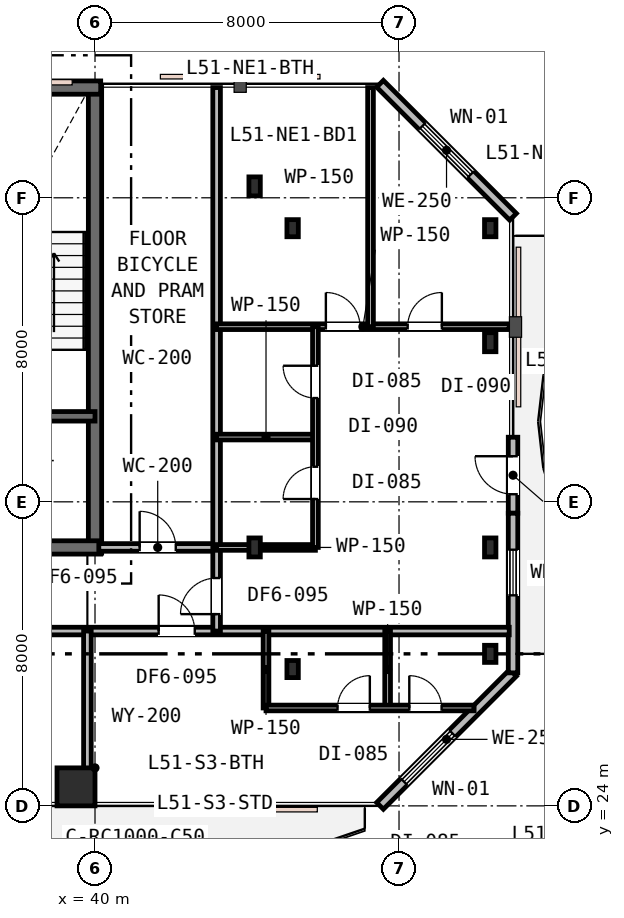
"""IFC4 building model, lengths in metres.
Left out: names, types, materials, properties, quantities, classifications, styles, units other than length and angle.
Written with IfcOpenShell. Run it as: python <this file> out.ifc"""

import sys

from ifc_helpers import new_model, si_unit, direction, frame, frame_2d, origin, origin_2d, place, context, subcontext, project, spatial, rectangle, i_section, extrude, element, fill, save


model = new_model("IFC4")
c1 = context("Model", 3, precision=1e-05, world=origin(), true_north=direction((0.0, 1.0)))
c2 = subcontext(c1, "Body", "Model", "MODEL_VIEW")
j1 = project(units=[si_unit("LENGTHUNIT", "METRE"), si_unit("PLANEANGLEUNIT", "RADIAN")], contexts=[c1])
p1 = place(None, origin())
s1 = spatial("IfcSite", under=j1, at=p1, CompositionType="ELEMENT")
p2 = place(p1, origin())
s2 = spatial("IfcBuilding", under=s1, at=p2, CompositionType="ELEMENT")
p3 = place(p2, frame((0.0, 0.0, 197.4)))
s3 = spatial("IfcBuildingStorey", under=s2, at=p3, CompositionType="ELEMENT", Elevation=197.4)
p4 = place(p3, frame((40.0, 30.65, 0.0), z_axis=(0.0, 0.0, 1.0), x_axis=(0.0, 1.0, 0.0)))
e1 = element("IfcWall", 1, at=p4, inside=s3, PredefinedType="SHEAR", context=c2, shape_type="SweptSolid", body=[
    extrude(rectangle(XDim=12.3, YDim=0.35, at=frame_2d((6.15, 0.0))), origin(), (0.0, 0.0, 1.0), 3.6),
])
p5 = place(p3, frame((15.85, 42.9, 0.0), z_axis=(0.0, 0.0, 1.0), x_axis=(1.0, 0.0, 0.0)))
e2 = element("IfcWall", 2, at=p5, inside=s3, PredefinedType="SHEAR", context=c2, shape_type="SweptSolid", body=[
    extrude(rectangle(XDim=24.3, YDim=0.35, at=frame_2d((12.15, 0.0))), origin(), (0.0, 0.0, 1.0), 3.6),
])
p6 = place(p5, frame((1.6, 0.0, 0.95)))
e3 = element("IfcOpeningElement", 3, at=p6, cuts=e2, PredefinedType="OPENING", context=c2, shape_type="SweptSolid", body=[
    extrude(rectangle(XDim=1.2, YDim=1.6, at=frame_2d((0.6, 0.8))), frame((0.0, 0.185, 0.0), z_axis=(0.0, -1.0, 0.0), x_axis=(1.0, 0.0, 0.0)), (0.0, 0.0, 1.0), 0.37),
])
p7 = place(p5, frame((16.5, 0.0, 0.95)))
e4 = element("IfcOpeningElement", 4, at=p7, cuts=e2, PredefinedType="OPENING", context=c2, shape_type="SweptSolid", body=[
    extrude(rectangle(XDim=1.2, YDim=1.6, at=frame_2d((0.6, 0.8))), frame((0.0, 0.185, 0.0), z_axis=(0.0, -1.0, 0.0), x_axis=(1.0, 0.0, 0.0)), (0.0, 0.0, 1.0), 0.37),
])
p8 = place(p5, frame((21.6, 0.0, 0.95)))
e5 = element("IfcOpeningElement", 5, at=p8, cuts=e2, PredefinedType="OPENING", context=c2, shape_type="SweptSolid", body=[
    extrude(rectangle(XDim=1.2, YDim=1.6, at=frame_2d((0.6, 0.8))), frame((0.0, 0.185, 0.0), z_axis=(0.0, -1.0, 0.0), x_axis=(1.0, 0.0, 0.0)), (0.0, 0.0, 1.0), 0.37),
])
p9 = place(p3, frame((28.95, 30.8, 0.0), z_axis=(0.0, 0.0, 1.0), x_axis=(1.0, 0.0, 0.0)))
e6 = element("IfcWall", 6, at=p9, inside=s3, PredefinedType="SHEAR", context=c2, shape_type="SweptSolid", body=[
    extrude(rectangle(XDim=11.2, YDim=0.35, at=frame_2d((5.6, 0.0))), origin(), (0.0, 0.0, 1.0), 3.6),
])
p10 = place(p9, frame((7.65, 0.0, 0.0)))
e7 = element("IfcOpeningElement", 7, at=p10, cuts=e6, PredefinedType="OPENING", context=c2, shape_type="SweptSolid", body=[
    extrude(rectangle(XDim=1.1, YDim=2.15, at=frame_2d((0.55, 1.075))), frame((0.0, 0.185, 0.0), z_axis=(0.0, -1.0, 0.0), x_axis=(1.0, 0.0, 0.0)), (0.0, 0.0, 1.0), 0.37),
])
p11 = place(p3, frame((33.95, 34.25, 0.0), z_axis=(0.0, 0.0, 1.0), x_axis=(1.0, 0.0, 0.0)))
e8 = element("IfcWall", 8, at=p11, inside=s3, PredefinedType="SHEAR", context=c2, shape_type="SweptSolid", body=[
    extrude(rectangle(XDim=6.05, YDim=0.25, at=frame_2d((3.025, 0.0))), origin(), (0.0, 0.0, 1.0), 3.6),
])
p12 = place(p11, frame((3.7, 0.0, 0.0)))
e9 = element("IfcOpeningElement", 9, at=p12, cuts=e8, PredefinedType="OPENING", context=c2, shape_type="SweptSolid", body=[
    extrude(rectangle(XDim=1.0, YDim=2.15, at=frame_2d((0.5, 1.075))), frame((0.0, 0.135, 0.0), z_axis=(0.0, -1.0, 0.0), x_axis=(1.0, 0.0, 0.0)), (0.0, 0.0, 1.0), 0.27),
])
p13 = place(p11, frame((0.55, 0.0, 0.0)))
e10 = element("IfcOpeningElement", 10, at=p13, cuts=e8, PredefinedType="OPENING", context=c2, shape_type="SweptSolid", body=[
    extrude(rectangle(XDim=1.1, YDim=2.15, at=frame_2d((0.55, 1.075))), frame((0.0, 0.135, 0.0), z_axis=(0.0, -1.0, 0.0), x_axis=(1.0, 0.0, 0.0)), (0.0, 0.0, 1.0), 0.27),
])
p14 = place(p3, frame((39.5, 24.5, 0.0), z_axis=(0.0, 0.0, 1.0), x_axis=(1.0, 0.0, 0.0)))
e11 = element("IfcColumn", 11, at=p14, inside=s3, PredefinedType="COLUMN", context=c2, shape_type="SweptSolid", body=[
    extrude(rectangle(XDim=1.0, YDim=1.0, at=origin_2d()), origin(), (0.0, 0.0, 1.0), 3.6),
])
for number, where, z_axis, x_axis in (
    (12, (45.2, 27.6, 0.0), (0.0, 0.0, 1.0), (1.0, 0.0, 0.0)),
    (13, (45.2, 39.2, 0.0), (0.0, 0.0, 1.0), (1.0, 0.0, 0.0)),
    (14, (50.4, 28.0, 0.0), (0.0, 0.0, 1.0), (1.0, 0.0, 0.0)),
    (15, (50.4, 39.2, 0.0), (0.0, 0.0, 1.0), (1.0, 0.0, 0.0)),
):
    element("IfcColumn", number, at=place(p3, frame(where, z_axis=z_axis, x_axis=x_axis)), inside=s3, PredefinedType="COLUMN", context=c2, shape_type="SweptSolid", body=[
        extrude(i_section(OverallWidth=0.3, OverallDepth=0.45, WebThickness=0.014, FlangeThickness=0.026, FilletRadius=0.027, at=origin_2d()), origin(), (0.0, 0.0, 1.0), 3.6),
    ])
for number, where, z_axis, x_axis in (
    (16, (44.2, 30.8, 0.0), (0.0, 0.0, 1.0), (1.0, 0.0, 0.0)),
    (17, (44.2, 40.3, 0.0), (0.0, 0.0, 1.0), (1.0, 0.0, 0.0)),
    (18, (50.4, 30.8, 0.0), (0.0, 0.0, 1.0), (1.0, 0.0, 0.0)),
    (19, (50.4, 36.2, 0.0), (0.0, 0.0, 1.0), (1.0, 0.0, 0.0)),
):
    element("IfcColumn", number, at=place(p3, frame(where, z_axis=z_axis, x_axis=x_axis)), inside=s3, PredefinedType="COLUMN", context=c2, shape_type="SweptSolid", body=[
        extrude(i_section(OverallWidth=0.3, OverallDepth=0.5, WebThickness=0.015, FlangeThickness=0.028, FilletRadius=0.027, at=origin_2d()), origin(), (0.0, 0.0, 1.0), 3.6),
    ])
p15 = place(p3, frame((47.5, 24.0, 0.0), z_axis=(0.0, 0.0, 1.0), x_axis=(0.707106781187, 0.707106781187, 0.0)))
e20 = element("IfcWall", 20, at=p15, inside=s3, PredefinedType="STANDARD", context=c2, shape_type="SweptSolid", body=[
    extrude(rectangle(XDim=4.95, YDim=0.25, at=frame_2d((2.475, 0.0))), origin(), (0.0, 0.0, 1.0), 3.33),
])
p16 = place(p15, frame((0.896, 0.0, 0.75)))
e21 = element("IfcOpeningElement", 21, at=p16, cuts=e20, PredefinedType="OPENING", context=c2, shape_type="SweptSolid", body=[
    extrude(rectangle(XDim=1.8, YDim=1.85, at=frame_2d((0.9, 0.925))), frame((0.0, 0.135, 0.0), z_axis=(0.0, -1.0, 0.0), x_axis=(1.0, 0.0, 0.0)), (0.0, 0.0, 1.0), 0.27),
])
p17 = place(p3, frame((51.0, 31.7, 0.0), z_axis=(0.0, 0.0, 1.0), x_axis=(0.0, 1.0, 0.0)))
e22 = element("IfcWall", 22, at=p17, inside=s3, PredefinedType="STANDARD", context=c2, shape_type="SweptSolid", body=[
    extrude(rectangle(XDim=2.0, YDim=0.25, at=frame_2d((1.0, 0.0))), origin(), (0.0, 0.0, 1.0), 3.33),
])
p18 = place(p17, frame((0.5, 0.0, 0.0)))
e23 = element("IfcOpeningElement", 23, at=p18, cuts=e22, PredefinedType="OPENING", context=c2, shape_type="SweptSolid", body=[
    extrude(rectangle(XDim=1.0, YDim=2.15, at=frame_2d((0.5, 1.075))), frame((0.0, 0.135, 0.0), z_axis=(0.0, -1.0, 0.0), x_axis=(1.0, 0.0, 0.0)), (0.0, 0.0, 1.0), 0.27),
])
p19 = place(p3, frame((51.0, 27.5, 0.0), z_axis=(0.0, 0.0, 1.0), x_axis=(0.0, 1.0, 0.0)))
e24 = element("IfcWall", 24, at=p19, inside=s3, PredefinedType="STANDARD", context=c2, shape_type="SweptSolid", body=[
    extrude(rectangle(XDim=4.2, YDim=0.25, at=frame_2d((2.1, 0.0))), origin(), (0.0, 0.0, 1.0), 3.33),
])
p20 = place(p19, frame((2.04, 0.0, 0.85)))
e25 = element("IfcOpeningElement", 25, at=p20, cuts=e24, PredefinedType="OPENING", context=c2, shape_type="SweptSolid", body=[
    extrude(rectangle(XDim=1.2, YDim=1.6, at=frame_2d((0.6, 0.8))), frame((0.0, 0.135, 0.0), z_axis=(0.0, -1.0, 0.0), x_axis=(1.0, 0.0, 0.0)), (0.0, 0.0, 1.0), 0.27),
])
p21 = place(p3, frame((51.0, 39.5, 0.0), z_axis=(0.0, 0.0, 1.0), x_axis=(-0.707106781187, 0.707106781187, 0.0)))
e26 = element("IfcWall", 26, at=p21, inside=s3, PredefinedType="STANDARD", context=c2, shape_type="SweptSolid", body=[
    extrude(rectangle(XDim=4.95, YDim=0.25, at=frame_2d((2.475, 0.0))), origin(), (0.0, 0.0, 1.0), 3.33),
])
p22 = place(p21, frame((1.575, 0.0, 0.75)))
e27 = element("IfcOpeningElement", 27, at=p22, cuts=e26, PredefinedType="OPENING", context=c2, shape_type="SweptSolid", body=[
    extrude(rectangle(XDim=1.8, YDim=1.85, at=frame_2d((0.9, 0.925))), frame((0.0, 0.135, 0.0), z_axis=(0.0, -1.0, 0.0), x_axis=(1.0, 0.0, 0.0)), (0.0, 0.0, 1.0), 0.27),
])
p23 = place(p3, frame((15.4, 28.6, 0.0), z_axis=(0.0, 0.0, 1.0), x_axis=(1.0, 0.0, 0.0)))
e28 = element("IfcWall", 28, at=p23, inside=s3, PredefinedType="PARTITIONING", context=c2, shape_type="SweptSolid", body=[
    extrude(rectangle(XDim=35.5, YDim=0.2, at=frame_2d((17.75, 0.0))), origin(), (0.0, 0.0, 1.0), 2.92),
])
p24 = place(p23, frame((11.525, 0.0, 0.0)))
e29 = element("IfcOpeningElement", 29, at=p24, cuts=e28, PredefinedType="OPENING", context=c2, shape_type="SweptSolid", body=[
    extrude(rectangle(XDim=0.95, YDim=2.15, at=frame_2d((0.475, 1.075))), frame((0.0, 0.11, 0.0), z_axis=(0.0, -1.0, 0.0), x_axis=(1.0, 0.0, 0.0)), (0.0, 0.0, 1.0), 0.22),
])
p25 = place(p23, frame((19.425, 0.0, 0.0)))
e30 = element("IfcOpeningElement", 30, at=p25, cuts=e28, PredefinedType="OPENING", context=c2, shape_type="SweptSolid", body=[
    extrude(rectangle(XDim=0.95, YDim=2.15, at=frame_2d((0.475, 1.075))), frame((0.0, 0.11, 0.0), z_axis=(0.0, -1.0, 0.0), x_axis=(1.0, 0.0, 0.0)), (0.0, 0.0, 1.0), 0.22),
])
p26 = place(p23, frame((26.275, 0.0, 0.0)))
e31 = element("IfcOpeningElement", 31, at=p26, cuts=e28, PredefinedType="OPENING", context=c2, shape_type="SweptSolid", body=[
    extrude(rectangle(XDim=0.95, YDim=2.15, at=frame_2d((0.475, 1.075))), frame((0.0, 0.11, 0.0), z_axis=(0.0, -1.0, 0.0), x_axis=(1.0, 0.0, 0.0)), (0.0, 0.0, 1.0), 0.22),
])
p27 = place(p3, frame((40.1, 30.8, 0.0), z_axis=(0.0, 0.0, 1.0), x_axis=(1.0, 0.0, 0.0)))
e32 = element("IfcWall", 32, at=p27, inside=s3, PredefinedType="PARTITIONING", context=c2, shape_type="SweptSolid", body=[
    extrude(rectangle(XDim=3.1, YDim=0.2, at=frame_2d((1.55, 0.0))), origin(), (0.0, 0.0, 1.0), 2.92),
])
p28 = place(p27, frame((1.075, 0.0, 0.0)))
e33 = element("IfcOpeningElement", 33, at=p28, cuts=e32, PredefinedType="OPENING", context=c2, shape_type="SweptSolid", body=[
    extrude(rectangle(XDim=0.95, YDim=2.15, at=frame_2d((0.475, 1.075))), frame((0.0, 0.11, 0.0), z_axis=(0.0, -1.0, 0.0), x_axis=(1.0, 0.0, 0.0)), (0.0, 0.0, 1.0), 0.22),
])
p29 = place(p3, frame((43.2, 28.6, 0.0), z_axis=(0.0, 0.0, 1.0), x_axis=(0.0, 1.0, 0.0)))
e34 = element("IfcWall", 34, at=p29, inside=s3, PredefinedType="PARTITIONING", context=c2, shape_type="SweptSolid", body=[
    extrude(rectangle(XDim=14.3, YDim=0.2, at=frame_2d((7.15, 0.0))), origin(), (0.0, 0.0, 1.0), 2.92),
])
p30 = place(p29, frame((0.445, 0.0, 0.0)))
e35 = element("IfcOpeningElement", 35, at=p30, cuts=e34, PredefinedType="OPENING", context=c2, shape_type="SweptSolid", body=[
    extrude(rectangle(XDim=0.95, YDim=2.15, at=frame_2d((0.475, 1.075))), frame((0.0, 0.11, 0.0), z_axis=(0.0, -1.0, 0.0), x_axis=(1.0, 0.0, 0.0)), (0.0, 0.0, 1.0), 0.22),
])
for number, where, z_axis, x_axis in (
    (36, (43.2, 30.8, 0.0), (0.0, 0.0, 1.0), (1.0, 0.0, 0.0)),
    (37, (43.2, 33.704, 0.0), (0.0, 0.0, 1.0), (1.0, 0.0, 0.0)),
):
    element("IfcWall", number, at=place(p3, frame(where, z_axis=z_axis, x_axis=x_axis)), inside=s3, PredefinedType="PARTITIONING", context=c2, shape_type="SweptSolid", body=[
        extrude(rectangle(XDim=2.6, YDim=0.15, at=frame_2d((1.3, 0.0))), origin(), (0.0, 0.0, 1.0), 2.92),
    ])
p31 = place(p3, frame((43.2, 36.608, 0.0), z_axis=(0.0, 0.0, 1.0), x_axis=(1.0, 0.0, 0.0)))
e38 = element("IfcWall", 38, at=p31, inside=s3, PredefinedType="PARTITIONING", context=c2, shape_type="SweptSolid", body=[
    extrude(rectangle(XDim=7.7, YDim=0.15, at=frame_2d((3.85, 0.0))), origin(), (0.0, 0.0, 1.0), 2.92),
])
p32 = place(p31, frame((2.875, 0.0, 0.0)))
e39 = element("IfcOpeningElement", 39, at=p32, cuts=e38, PredefinedType="OPENING", context=c2, shape_type="SweptSolid", body=[
    extrude(rectangle(XDim=0.9, YDim=2.15, at=frame_2d((0.45, 1.075))), frame((0.0, 0.085, 0.0), z_axis=(0.0, -1.0, 0.0), x_axis=(1.0, 0.0, 0.0)), (0.0, 0.0, 1.0), 0.17),
])
p33 = place(p31, frame((5.027, 0.0, 0.0)))
e40 = element("IfcOpeningElement", 40, at=p33, cuts=e38, PredefinedType="OPENING", context=c2, shape_type="SweptSolid", body=[
    extrude(rectangle(XDim=0.9, YDim=2.15, at=frame_2d((0.45, 1.075))), frame((0.0, 0.085, 0.0), z_axis=(0.0, -1.0, 0.0), x_axis=(1.0, 0.0, 0.0)), (0.0, 0.0, 1.0), 0.17),
])
p34 = place(p3, frame((45.8, 30.8, 0.0), z_axis=(0.0, 0.0, 1.0), x_axis=(0.0, 1.0, 0.0)))
e41 = element("IfcWall", 41, at=p34, inside=s3, PredefinedType="PARTITIONING", context=c2, shape_type="SweptSolid", body=[
    extrude(rectangle(XDim=5.808, YDim=0.15, at=frame_2d((2.904, 0.0))), origin(), (0.0, 0.0, 1.0), 2.92),
])
p35 = place(p34, frame((1.274, 0.0, 0.0)))
e42 = element("IfcOpeningElement", 42, at=p35, cuts=e41, PredefinedType="OPENING", context=c2, shape_type="SweptSolid", body=[
    extrude(rectangle(XDim=0.85, YDim=2.15, at=frame_2d((0.425, 1.075))), frame((0.0, 0.085, 0.0), z_axis=(0.0, -1.0, 0.0), x_axis=(1.0, 0.0, 0.0)), (0.0, 0.0, 1.0), 0.17),
])
p36 = place(p34, frame((3.931, 0.0, 0.0)))
e43 = element("IfcOpeningElement", 43, at=p36, cuts=e41, PredefinedType="OPENING", context=c2, shape_type="SweptSolid", body=[
    extrude(rectangle(XDim=0.85, YDim=2.15, at=frame_2d((0.425, 1.075))), frame((0.0, 0.085, 0.0), z_axis=(0.0, -1.0, 0.0), x_axis=(1.0, 0.0, 0.0)), (0.0, 0.0, 1.0), 0.17),
])
p37 = place(p3, frame((47.25, 36.608, 0.0), z_axis=(0.0, 0.0, 1.0), x_axis=(0.0, 1.0, 0.0)))
e44 = element("IfcWall", 44, at=p37, inside=s3, PredefinedType="PARTITIONING", context=c2, shape_type="SweptSolid", body=[
    extrude(rectangle(XDim=6.292, YDim=0.15, at=frame_2d((3.146, 0.0))), origin(), (0.0, 0.0, 1.0), 3.02),
])
p38 = place(p3, frame((39.8, 24.1, 0.0), z_axis=(0.0, 0.0, 1.0), x_axis=(0.0, 1.0, 0.0)))
e45 = element("IfcWall", 45, at=p38, inside=s3, PredefinedType="PARTITIONING", context=c2, shape_type="SweptSolid", body=[
    extrude(rectangle(XDim=4.5, YDim=0.2, at=frame_2d((2.25, 0.0))), origin(), (0.0, 0.0, 1.0), 2.92),
])
for number, where, z_axis, x_axis in (
    (46, (44.5, 26.576, 0.0), (0.0, 0.0, 1.0), (0.0, 1.0, 0.0)),
    (47, (47.7, 26.576, 0.0), (0.0, 0.0, 1.0), (0.0, 1.0, 0.0)),
):
    element("IfcWall", number, at=place(p3, frame(where, z_axis=z_axis, x_axis=x_axis)), inside=s3, PredefinedType="PARTITIONING", context=c2, shape_type="SweptSolid", body=[
        extrude(rectangle(XDim=2.024, YDim=0.15, at=frame_2d((1.012, 0.0))), origin(), (0.0, 0.0, 1.0), 3.33),
    ])
p39 = place(p3, frame((44.5, 26.576, 0.0), z_axis=(0.0, 0.0, 1.0), x_axis=(1.0, 0.0, 0.0)))
e48 = element("IfcWall", 48, at=p39, inside=s3, PredefinedType="PARTITIONING", context=c2, shape_type="SweptSolid", body=[
    extrude(rectangle(XDim=5.476, YDim=0.15, at=frame_2d((2.738, 0.0))), origin(), (0.0, 0.0, 1.0), 3.33),
])
p40 = place(p39, frame((1.882, 0.0, 0.0)))
e49 = element("IfcOpeningElement", 49, at=p40, cuts=e48, PredefinedType="OPENING", context=c2, shape_type="SweptSolid", body=[
    extrude(rectangle(XDim=0.85, YDim=2.15, at=frame_2d((0.425, 1.075))), frame((0.0, 0.085, 0.0), z_axis=(0.0, -1.0, 0.0), x_axis=(1.0, 0.0, 0.0)), (0.0, 0.0, 1.0), 0.17),
])
p41 = place(p39, frame((3.77, 0.0, 0.0)))
e50 = element("IfcOpeningElement", 50, at=p41, cuts=e48, PredefinedType="OPENING", context=c2, shape_type="SweptSolid", body=[
    extrude(rectangle(XDim=0.85, YDim=2.15, at=frame_2d((0.425, 1.075))), frame((0.0, 0.085, 0.0), z_axis=(0.0, -1.0, 0.0), x_axis=(1.0, 0.0, 0.0)), (0.0, 0.0, 1.0), 0.17),
])
p42 = place(p16, origin())
e51 = element("IfcWindow", 51, at=p42, inside=s3, PartitioningType="SINGLE_PANEL", PredefinedType="WINDOW", context=c2, shape_type="SweptSolid", body=[
    extrude(rectangle(XDim=1.8, YDim=1.85, at=frame_2d((0.9, 0.925))), frame((0.0, 0.03, 0.0), z_axis=(0.0, -1.0, 0.0), x_axis=(1.0, 0.0, 0.0)), (0.0, 0.0, 1.0), 0.06),
])
fill(e21, e51)
p43 = place(p18, origin())
e52 = element("IfcDoor", 52, at=p43, inside=s3, OperationType="SINGLE_SWING_RIGHT", PredefinedType="DOOR", context=c2, shape_type="SweptSolid", body=[
    extrude(rectangle(XDim=1.0, YDim=2.15, at=frame_2d((0.5, 1.075))), frame((0.0, 0.025, 0.0), z_axis=(0.0, -1.0, 0.0), x_axis=(1.0, 0.0, 0.0)), (0.0, 0.0, 1.0), 0.05),
])
fill(e23, e52)
p44 = place(p20, origin())
e53 = element("IfcWindow", 53, at=p44, inside=s3, PartitioningType="SINGLE_PANEL", PredefinedType="WINDOW", context=c2, shape_type="SweptSolid", body=[
    extrude(rectangle(XDim=1.2, YDim=1.6, at=frame_2d((0.6, 0.8))), frame((0.0, 0.03, 0.0), z_axis=(0.0, -1.0, 0.0), x_axis=(1.0, 0.0, 0.0)), (0.0, 0.0, 1.0), 0.06),
])
fill(e25, e53)
p45 = place(p22, origin())
e54 = element("IfcWindow", 54, at=p45, inside=s3, PartitioningType="SINGLE_PANEL", PredefinedType="WINDOW", context=c2, shape_type="SweptSolid", body=[
    extrude(rectangle(XDim=1.8, YDim=1.85, at=frame_2d((0.9, 0.925))), frame((0.0, 0.03, 0.0), z_axis=(0.0, -1.0, 0.0), x_axis=(1.0, 0.0, 0.0)), (0.0, 0.0, 1.0), 0.06),
])
fill(e27, e54)
p46 = place(p28, origin())
e55 = element("IfcDoor", 55, at=p46, inside=s3, OperationType="SINGLE_SWING_LEFT", PredefinedType="DOOR", context=c2, shape_type="SweptSolid", body=[
    extrude(rectangle(XDim=0.95, YDim=2.15, at=frame_2d((0.475, 1.075))), frame((0.0, 0.025, 0.0), z_axis=(0.0, -1.0, 0.0), x_axis=(1.0, 0.0, 0.0)), (0.0, 0.0, 1.0), 0.05),
])
fill(e33, e55)
p47 = place(p30, origin())
e56 = element("IfcDoor", 56, at=p47, inside=s3, OperationType="SINGLE_SWING_LEFT", PredefinedType="DOOR", context=c2, shape_type="SweptSolid", body=[
    extrude(rectangle(XDim=0.95, YDim=2.15, at=frame_2d((0.475, 1.075))), frame((0.0, 0.025, 0.0), z_axis=(0.0, -1.0, 0.0), x_axis=(1.0, 0.0, 0.0)), (0.0, 0.0, 1.0), 0.05),
])
fill(e35, e56)
p48 = place(p35, origin())
e57 = element("IfcDoor", 57, at=p48, inside=s3, OperationType="SINGLE_SWING_LEFT", PredefinedType="DOOR", context=c2, shape_type="SweptSolid", body=[
    extrude(rectangle(XDim=0.85, YDim=2.15, at=frame_2d((0.425, 1.075))), frame((0.0, 0.025, 0.0), z_axis=(0.0, -1.0, 0.0), x_axis=(1.0, 0.0, 0.0)), (0.0, 0.0, 1.0), 0.05),
])
fill(e42, e57)
p49 = place(p36, origin())
e58 = element("IfcDoor", 58, at=p49, inside=s3, OperationType="SINGLE_SWING_RIGHT", PredefinedType="DOOR", context=c2, shape_type="SweptSolid", body=[
    extrude(rectangle(XDim=0.85, YDim=2.15, at=frame_2d((0.425, 1.075))), frame((0.0, 0.025, 0.0), z_axis=(0.0, -1.0, 0.0), x_axis=(1.0, 0.0, 0.0)), (0.0, 0.0, 1.0), 0.05),
])
fill(e43, e58)
p50 = place(p32, origin())
e59 = element("IfcDoor", 59, at=p50, inside=s3, OperationType="SINGLE_SWING_LEFT", PredefinedType="DOOR", context=c2, shape_type="SweptSolid", body=[
    extrude(rectangle(XDim=0.9, YDim=2.15, at=frame_2d((0.45, 1.075))), frame((0.0, 0.025, 0.0), z_axis=(0.0, -1.0, 0.0), x_axis=(1.0, 0.0, 0.0)), (0.0, 0.0, 1.0), 0.05),
])
fill(e39, e59)
p51 = place(p33, origin())
e60 = element("IfcDoor", 60, at=p51, inside=s3, OperationType="SINGLE_SWING_RIGHT", PredefinedType="DOOR", context=c2, shape_type="SweptSolid", body=[
    extrude(rectangle(XDim=0.9, YDim=2.15, at=frame_2d((0.45, 1.075))), frame((0.0, 0.025, 0.0), z_axis=(0.0, -1.0, 0.0), x_axis=(1.0, 0.0, 0.0)), (0.0, 0.0, 1.0), 0.05),
])
fill(e40, e60)
p52 = place(p26, origin())
e61 = element("IfcDoor", 61, at=p52, inside=s3, OperationType="SINGLE_SWING_LEFT", PredefinedType="DOOR", context=c2, shape_type="SweptSolid", body=[
    extrude(rectangle(XDim=0.95, YDim=2.15, at=frame_2d((0.475, 1.075))), frame((0.0, 0.025, 0.0), z_axis=(0.0, -1.0, 0.0), x_axis=(1.0, 0.0, 0.0)), (0.0, 0.0, 1.0), 0.05),
])
fill(e31, e61)
p53 = place(p40, origin())
e62 = element("IfcDoor", 62, at=p53, inside=s3, OperationType="SINGLE_SWING_RIGHT", PredefinedType="DOOR", context=c2, shape_type="SweptSolid", body=[
    extrude(rectangle(XDim=0.85, YDim=2.15, at=frame_2d((0.425, 1.075))), frame((0.0, 0.025, 0.0), z_axis=(0.0, -1.0, 0.0), x_axis=(1.0, 0.0, 0.0)), (0.0, 0.0, 1.0), 0.05),
])
fill(e49, e62)
p54 = place(p41, origin())
e63 = element("IfcDoor", 63, at=p54, inside=s3, OperationType="SINGLE_SWING_LEFT", PredefinedType="DOOR", context=c2, shape_type="SweptSolid", body=[
    extrude(rectangle(XDim=0.85, YDim=2.15, at=frame_2d((0.425, 1.075))), frame((0.0, 0.025, 0.0), z_axis=(0.0, -1.0, 0.0), x_axis=(1.0, 0.0, 0.0)), (0.0, 0.0, 1.0), 0.05),
])
fill(e50, e63)
save(model, sys.argv[1])
